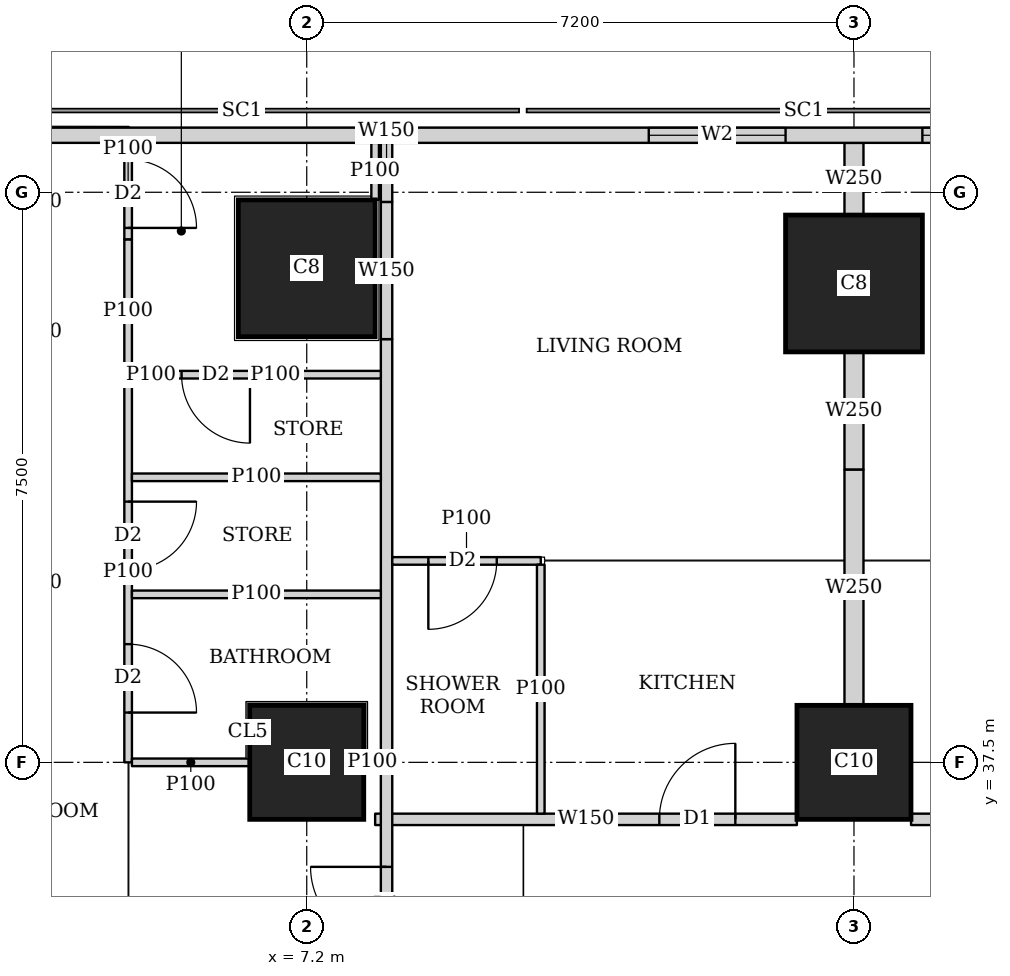
"""IFC4 building model, lengths in metres.
Left out: names, types, materials, properties, quantities, classifications, styles, units other than length and angle.
Written with IfcOpenShell. Run it as: python <this file> out.ifc"""

import sys

from ifc_helpers import new_model, si_unit, direction, frame, frame_2d, origin, origin_2d, place, context, subcontext, project, spatial, rectangle, extrude, element, fill, save


model = new_model("IFC4")
c1 = context("Model", 3, precision=1e-05, world=origin(), true_north=direction((0.0, 1.0)))
c2 = subcontext(c1, "Body", "Model", "MODEL_VIEW")
j1 = project(units=[si_unit("LENGTHUNIT", "METRE"), si_unit("PLANEANGLEUNIT", "RADIAN")], contexts=[c1])
p1 = place(None, origin())
s1 = spatial("IfcSite", under=j1, at=p1, CompositionType="ELEMENT")
p2 = place(p1, origin())
s2 = spatial("IfcBuilding", under=s1, at=p2, CompositionType="ELEMENT")
p3 = place(p2, frame((0.0, 0.0, 147.05)))
s3 = spatial("IfcBuildingStorey", under=s2, at=p3, CompositionType="ELEMENT", Elevation=147.05)
for number, where, z_axis, x_axis in (
    (1, (7.2, 37.5, 0.0), (0.0, 0.0, 1.0), (1.0, 0.0, 0.0)),
    (2, (14.4, 37.5, 0.0), (0.0, 0.0, 1.0), (1.0, 0.0, 0.0)),
):
    element("IfcColumn", number, at=place(p3, frame(where, z_axis=z_axis, x_axis=x_axis)), inside=s3, PredefinedType="COLUMN", context=c2, shape_type="SweptSolid", body=[
        extrude(rectangle(XDim=1.5, YDim=1.5, at=origin_2d()), origin(), (0.0, 0.0, 1.0), 3.75),
    ])
for number, where, z_axis, x_axis in (
    (3, (7.2, 44.0, 0.0), (0.0, 0.0, 1.0), (1.0, 0.0, 0.0)),
    (4, (14.4, 43.8, 0.0), (0.0, 0.0, 1.0), (1.0, 0.0, 0.0)),
):
    element("IfcColumn", number, at=place(p3, frame(where, z_axis=z_axis, x_axis=x_axis)), inside=s3, PredefinedType="COLUMN", context=c2, shape_type="SweptSolid", body=[
        extrude(rectangle(XDim=1.8, YDim=1.8, at=origin_2d()), origin(), (0.0, 0.0, 1.0), 3.75),
    ])
p4 = place(p3, frame((40.106, 45.75, 0.0), z_axis=(0.0, 0.0, 1.0), x_axis=(-1.0, 0.0, 0.0)))
e5 = element("IfcWall", 5, at=p4, inside=s3, PredefinedType="SOLIDWALL", context=c2, shape_type="SweptSolid", body=[
    extrude(rectangle(XDim=37.943, YDim=0.2, at=frame_2d((18.971, 0.0))), origin(), (0.0, 0.0, 1.0), 3.5),
])
p5 = place(p4, frame((8.606, 0.0, 0.9)))
e6 = element("IfcOpeningElement", 6, at=p5, cuts=e5, PredefinedType="OPENING", context=c2, shape_type="SweptSolid", body=[
    extrude(rectangle(XDim=1.8, YDim=1.5, at=frame_2d((0.9, 0.75))), frame((0.0, 0.11, 0.0), z_axis=(0.0, -1.0, 0.0), x_axis=(1.0, 0.0, 0.0)), (0.0, 0.0, 1.0), 0.22),
])
p6 = place(p4, frame((12.206, 0.0, 0.9)))
e7 = element("IfcOpeningElement", 7, at=p6, cuts=e5, PredefinedType="OPENING", context=c2, shape_type="SweptSolid", body=[
    extrude(rectangle(XDim=1.8, YDim=1.5, at=frame_2d((0.9, 0.75))), frame((0.0, 0.11, 0.0), z_axis=(0.0, -1.0, 0.0), x_axis=(1.0, 0.0, 0.0)), (0.0, 0.0, 1.0), 0.22),
])
p7 = place(p4, frame((15.806, 0.0, 0.9)))
e8 = element("IfcOpeningElement", 8, at=p7, cuts=e5, PredefinedType="OPENING", context=c2, shape_type="SweptSolid", body=[
    extrude(rectangle(XDim=1.8, YDim=1.5, at=frame_2d((0.9, 0.75))), frame((0.0, 0.11, 0.0), z_axis=(0.0, -1.0, 0.0), x_axis=(1.0, 0.0, 0.0)), (0.0, 0.0, 1.0), 0.22),
])
p8 = place(p4, frame((19.406, 0.0, 0.9)))
e9 = element("IfcOpeningElement", 9, at=p8, cuts=e5, PredefinedType="OPENING", context=c2, shape_type="SweptSolid", body=[
    extrude(rectangle(XDim=1.8, YDim=1.5, at=frame_2d((0.9, 0.75))), frame((0.0, 0.11, 0.0), z_axis=(0.0, -1.0, 0.0), x_axis=(1.0, 0.0, 0.0)), (0.0, 0.0, 1.0), 0.22),
])
p9 = place(p4, frame((23.006, 0.0, 0.9)))
e10 = element("IfcOpeningElement", 10, at=p9, cuts=e5, PredefinedType="OPENING", context=c2, shape_type="SweptSolid", body=[
    extrude(rectangle(XDim=1.8, YDim=1.5, at=frame_2d((0.9, 0.75))), frame((0.0, 0.11, 0.0), z_axis=(0.0, -1.0, 0.0), x_axis=(1.0, 0.0, 0.0)), (0.0, 0.0, 1.0), 0.22),
])
p10 = place(p4, frame((26.606, 0.0, 0.9)))
e11 = element("IfcOpeningElement", 11, at=p10, cuts=e5, PredefinedType="OPENING", context=c2, shape_type="SweptSolid", body=[
    extrude(rectangle(XDim=1.8, YDim=1.5, at=frame_2d((0.9, 0.75))), frame((0.0, 0.11, 0.0), z_axis=(0.0, -1.0, 0.0), x_axis=(1.0, 0.0, 0.0)), (0.0, 0.0, 1.0), 0.22),
])
p11 = place(p3, frame((8.25, 1.957, 0.0), z_axis=(0.0, 0.0, 1.0), x_axis=(0.0, 1.0, 0.0)))
e12 = element("IfcWall", 12, at=p11, inside=s3, PredefinedType="SOLIDWALL", context=c2, shape_type="SweptSolid", body=[
    extrude(rectangle(XDim=41.111, YDim=0.15, at=frame_2d((20.556, 0.0))), origin(), (0.0, 0.0, 1.0), 3.5),
])
p12 = place(p11, frame((14.418, 0.0, 0.0)))
e13 = element("IfcOpeningElement", 13, at=p12, cuts=e12, PredefinedType="OPENING", context=c2, shape_type="SweptSolid", body=[
    extrude(rectangle(XDim=1.0, YDim=2.1, at=frame_2d((0.5, 1.05))), frame((0.0, 0.085, 0.0), z_axis=(0.0, -1.0, 0.0), x_axis=(1.0, 0.0, 0.0)), (0.0, 0.0, 1.0), 0.17),
])
p13 = place(p11, frame((18.168, 0.0, 0.0)))
e14 = element("IfcOpeningElement", 14, at=p13, cuts=e12, PredefinedType="OPENING", context=c2, shape_type="SweptSolid", body=[
    extrude(rectangle(XDim=1.0, YDim=2.1, at=frame_2d((0.5, 1.05))), frame((0.0, 0.085, 0.0), z_axis=(0.0, -1.0, 0.0), x_axis=(1.0, 0.0, 0.0)), (0.0, 0.0, 1.0), 0.17),
])
p14 = place(p11, frame((33.168, 0.0, 0.0)))
e15 = element("IfcOpeningElement", 15, at=p14, cuts=e12, PredefinedType="OPENING", context=c2, shape_type="SweptSolid", body=[
    extrude(rectangle(XDim=1.0, YDim=2.1, at=frame_2d((0.5, 1.05))), frame((0.0, 0.085, 0.0), z_axis=(0.0, -1.0, 0.0), x_axis=(1.0, 0.0, 0.0)), (0.0, 0.0, 1.0), 0.17),
])
p15 = place(p3, frame((8.25, 43.068, 0.0), z_axis=(0.0, 0.0, 1.0), x_axis=(0.0, 1.0, 0.0)))
e16 = element("IfcWall", 16, at=p15, inside=s3, PredefinedType="SOLIDWALL", context=c2, shape_type="SweptSolid", body=[
    extrude(rectangle(XDim=1.805, YDim=0.15, at=frame_2d((0.902, 0.0))), origin(), (0.0, 0.0, 1.0), 2.1),
])
p16 = place(p3, frame((8.25, 44.873, 0.0), z_axis=(0.0, 0.0, 1.0), x_axis=(0.0, 1.0, 0.0)))
e17 = element("IfcWall", 17, at=p16, inside=s3, PredefinedType="SOLIDWALL", context=c2, shape_type="SweptSolid", body=[
    extrude(rectangle(XDim=0.777, YDim=0.15, at=frame_2d((0.388, 0.0))), origin(), (0.0, 0.0, 1.0), 3.5),
])
p17 = place(p3, frame((8.1, 36.75, 0.0), z_axis=(0.0, 0.0, 1.0), x_axis=(1.0, 0.0, 0.0)))
e18 = element("IfcWall", 18, at=p17, inside=s3, PredefinedType="SOLIDWALL", context=c2, shape_type="SweptSolid", body=[
    extrude(rectangle(XDim=5.549, YDim=0.15, at=frame_2d((2.774, 0.0))), origin(), (0.0, 0.0, 1.0), 3.5),
])
p18 = place(p17, frame((3.739, 0.0, 0.0)))
e19 = element("IfcOpeningElement", 19, at=p18, cuts=e18, PredefinedType="OPENING", context=c2, shape_type="SweptSolid", body=[
    extrude(rectangle(XDim=1.0, YDim=2.1, at=frame_2d((0.5, 1.05))), frame((0.0, 0.085, 0.0), z_axis=(0.0, -1.0, 0.0), x_axis=(1.0, 0.0, 0.0)), (0.0, 0.0, 1.0), 0.17),
])
p19 = place(p3, frame((15.151, 36.75, 0.0), z_axis=(0.0, 0.0, 1.0), x_axis=(1.0, 0.0, 0.0)))
e20 = element("IfcWall", 20, at=p19, inside=s3, PredefinedType="SOLIDWALL", context=c2, shape_type="SweptSolid", body=[
    extrude(rectangle(XDim=5.698, YDim=0.15, at=frame_2d((2.849, 0.0))), origin(), (0.0, 0.0, 1.0), 3.5),
])
p20 = place(p19, frame((0.749, 0.0, 0.0)))
e21 = element("IfcOpeningElement", 21, at=p20, cuts=e20, PredefinedType="OPENING", context=c2, shape_type="SweptSolid", body=[
    extrude(rectangle(XDim=1.0, YDim=2.1, at=frame_2d((0.5, 1.05))), frame((0.0, 0.085, 0.0), z_axis=(0.0, -1.0, 0.0), x_axis=(1.0, 0.0, 0.0)), (0.0, 0.0, 1.0), 0.17),
])
p21 = place(p3, frame((8.1, 45.65, 0.0), z_axis=(0.0, 0.0, 1.0), x_axis=(0.0, -1.0, 0.0)))
e22 = element("IfcWall", 22, at=p21, inside=s3, PredefinedType="PARTITIONING", context=c2, shape_type="SweptSolid", body=[
    extrude(rectangle(XDim=0.749, YDim=0.1, at=frame_2d((0.375, 0.0))), origin(), (0.0, 0.0, 1.0), 3.5),
])
p22 = place(p3, frame((4.85, 37.5, 0.0), z_axis=(0.0, 0.0, 1.0), x_axis=(0.0, 1.0, 0.0)))
e23 = element("IfcWall", 23, at=p22, inside=s3, PredefinedType="PARTITIONING", context=c2, shape_type="SweptSolid", body=[
    extrude(rectangle(XDim=5.007, YDim=0.1, at=frame_2d((2.503, 0.0))), origin(), (0.0, 0.0, 1.0), 3.5),
])
p23 = place(p22, frame((0.655, 0.0, 0.0)))
e24 = element("IfcOpeningElement", 24, at=p23, cuts=e23, PredefinedType="OPENING", context=c2, shape_type="SweptSolid", body=[
    extrude(rectangle(XDim=0.9, YDim=2.1, at=frame_2d((0.45, 1.05))), frame((0.0, 0.06, 0.0), z_axis=(0.0, -1.0, 0.0), x_axis=(1.0, 0.0, 0.0)), (0.0, 0.0, 1.0), 0.12),
])
p24 = place(p22, frame((2.53, 0.0, 0.0)))
e25 = element("IfcOpeningElement", 25, at=p24, cuts=e23, PredefinedType="OPENING", context=c2, shape_type="SweptSolid", body=[
    extrude(rectangle(XDim=0.9, YDim=2.1, at=frame_2d((0.45, 1.05))), frame((0.0, 0.06, 0.0), z_axis=(0.0, -1.0, 0.0), x_axis=(1.0, 0.0, 0.0)), (0.0, 0.0, 1.0), 0.12),
])
p25 = place(p3, frame((4.85, 42.507, 0.0), z_axis=(0.0, 0.0, 1.0), x_axis=(0.0, 1.0, 0.0)))
e26 = element("IfcWall", 26, at=p25, inside=s3, PredefinedType="PARTITIONING", context=c2, shape_type="SweptSolid", body=[
    extrude(rectangle(XDim=1.874, YDim=0.1, at=frame_2d((0.937, 0.0))), origin(), (0.0, 0.0, 1.0), 2.1),
])
p26 = place(p3, frame((4.85, 44.381, 0.0), z_axis=(0.0, 0.0, 1.0), x_axis=(0.0, 1.0, 0.0)))
e27 = element("IfcWall", 27, at=p26, inside=s3, PredefinedType="PARTITIONING", context=c2, shape_type="SweptSolid", body=[
    extrude(rectangle(XDim=1.269, YDim=0.1, at=frame_2d((0.634, 0.0))), origin(), (0.0, 0.0, 1.0), 3.5),
])
p27 = place(p26, frame((0.15, 0.0, 0.0)))
e28 = element("IfcOpeningElement", 28, at=p27, cuts=e27, PredefinedType="OPENING", context=c2, shape_type="SweptSolid", body=[
    extrude(rectangle(XDim=0.9, YDim=2.1, at=frame_2d((0.45, 1.05))), frame((0.0, 0.06, 0.0), z_axis=(0.0, -1.0, 0.0), x_axis=(1.0, 0.0, 0.0)), (0.0, 0.0, 1.0), 0.12),
])
p28 = place(p3, frame((4.9, 37.5, 0.0), z_axis=(0.0, 0.0, 1.0), x_axis=(1.0, 0.0, 0.0)))
e29 = element("IfcWall", 29, at=p28, inside=s3, PredefinedType="PARTITIONING", context=c2, shape_type="SweptSolid", body=[
    extrude(rectangle(XDim=1.549, YDim=0.1, at=frame_2d((0.774, 0.0))), origin(), (0.0, 0.0, 1.0), 3.5),
])
p29 = place(p3, frame((7.951, 37.5, 0.0), z_axis=(0.0, 0.0, 1.0), x_axis=(1.0, 0.0, 0.0)))
e30 = element("IfcWall", 30, at=p29, inside=s3, PredefinedType="PARTITIONING", context=c2, shape_type="SweptSolid", body=[
    extrude(rectangle(XDim=0.224, YDim=0.1, at=frame_2d((0.112, 0.0))), origin(), (0.0, 0.0, 1.0), 3.5),
])
for number, where, z_axis, x_axis in (
    (31, (4.9, 41.25, 0.0), (0.0, 0.0, 1.0), (1.0, 0.0, 0.0)),
    (32, (4.9, 39.71, 0.0), (0.0, 0.0, 1.0), (1.0, 0.0, 0.0)),
):
    element("IfcWall", number, at=place(p3, frame(where, z_axis=z_axis, x_axis=x_axis)), inside=s3, PredefinedType="PARTITIONING", context=c2, shape_type="SweptSolid", body=[
        extrude(rectangle(XDim=3.275, YDim=0.1, at=frame_2d((1.638, 0.0))), origin(), (0.0, 0.0, 1.0), 3.5),
    ])
p30 = place(p3, frame((8.325, 40.15, 0.0), z_axis=(0.0, 0.0, 1.0), x_axis=(1.0, 0.0, 0.0)))
e33 = element("IfcWall", 33, at=p30, inside=s3, PredefinedType="PARTITIONING", context=c2, shape_type="SweptSolid", body=[
    extrude(rectangle(XDim=1.954, YDim=0.1, at=frame_2d((0.977, 0.0))), origin(), (0.0, 0.0, 1.0), 3.5),
])
p31 = place(p30, frame((0.475, 0.0, 0.0)))
e34 = element("IfcOpeningElement", 34, at=p31, cuts=e33, PredefinedType="OPENING", context=c2, shape_type="SweptSolid", body=[
    extrude(rectangle(XDim=0.9, YDim=2.1, at=frame_2d((0.45, 1.05))), frame((0.0, 0.06, 0.0), z_axis=(0.0, -1.0, 0.0), x_axis=(1.0, 0.0, 0.0)), (0.0, 0.0, 1.0), 0.12),
])
p32 = place(p3, frame((10.279, 36.825, 0.0), z_axis=(0.0, 0.0, 1.0), x_axis=(0.0, 1.0, 0.0)))
e35 = element("IfcWall", 35, at=p32, inside=s3, PredefinedType="PARTITIONING", context=c2, shape_type="SweptSolid", body=[
    extrude(rectangle(XDim=3.275, YDim=0.1, at=frame_2d((1.638, 0.0))), origin(), (0.0, 0.0, 1.0), 3.5),
])
p33 = place(p3, frame((14.4, 41.35, 0.0), z_axis=(0.0, 0.0, 1.0), x_axis=(0.0, 1.0, 0.0)))
e36 = element("IfcWall", 36, at=p33, inside=s3, PredefinedType="SOLIDWALL", context=c2, shape_type="SweptSolid", body=[
    extrude(rectangle(XDim=1.549, YDim=0.25, at=frame_2d((0.774, 0.0))), origin(), (0.0, 0.0, 1.0), 2.1),
])
p34 = place(p3, frame((14.4, 44.701, 0.0), z_axis=(0.0, 0.0, 1.0), x_axis=(0.0, 1.0, 0.0)))
e37 = element("IfcWall", 37, at=p34, inside=s3, PredefinedType="SOLIDWALL", context=c2, shape_type="SweptSolid", body=[
    extrude(rectangle(XDim=0.949, YDim=0.25, at=frame_2d((0.475, 0.0))), origin(), (0.0, 0.0, 1.0), 2.1),
])
p35 = place(p3, frame((14.4, 38.251, 0.0), z_axis=(0.0, 0.0, 1.0), x_axis=(0.0, 1.0, 0.0)))
e38 = element("IfcWall", 38, at=p35, inside=s3, PredefinedType="SOLIDWALL", context=c2, shape_type="SweptSolid", body=[
    extrude(rectangle(XDim=3.099, YDim=0.25, at=frame_2d((1.55, 0.0))), origin(), (0.0, 0.0, 1.0), 3.5),
])
p36 = place(p3, frame((4.9, 42.6, 0.0), z_axis=(0.0, 0.0, 1.0), x_axis=(1.0, 0.0, 0.0)))
e39 = element("IfcWall", 39, at=p36, inside=s3, PredefinedType="PARTITIONING", context=c2, shape_type="SweptSolid", body=[
    extrude(rectangle(XDim=0.503, YDim=0.1, at=frame_2d((0.251, 0.0))), origin(), (0.0, 0.0, 1.0), 2.1),
])
p37 = place(p3, frame((5.403, 42.6, 0.0), z_axis=(0.0, 0.0, 1.0), x_axis=(1.0, 0.0, 0.0)))
e40 = element("IfcWall", 40, at=p37, inside=s3, PredefinedType="PARTITIONING", context=c2, shape_type="SweptSolid", body=[
    extrude(rectangle(XDim=2.772, YDim=0.1, at=frame_2d((1.386, 0.0))), origin(), (0.0, 0.0, 1.0), 3.5),
])
p38 = place(p37, frame((0.15, 0.0, 0.0)))
e41 = element("IfcOpeningElement", 41, at=p38, cuts=e40, PredefinedType="OPENING", context=c2, shape_type="SweptSolid", body=[
    extrude(rectangle(XDim=0.9, YDim=2.1, at=frame_2d((0.45, 1.05))), frame((0.0, 0.06, 0.0), z_axis=(0.0, -1.0, 0.0), x_axis=(1.0, 0.0, 0.0)), (0.0, 0.0, 1.0), 0.12),
])
p39 = place(p9, origin())
e42 = element("IfcWindow", 42, at=p39, inside=s3, PartitioningType="SINGLE_PANEL", PredefinedType="WINDOW", context=c2, shape_type="SweptSolid", body=[
    extrude(rectangle(XDim=1.8, YDim=1.5, at=frame_2d((0.9, 0.75))), frame((0.0, 0.03, 0.0), z_axis=(0.0, -1.0, 0.0), x_axis=(1.0, 0.0, 0.0)), (0.0, 0.0, 1.0), 0.06),
])
fill(e10, e42)
p40 = place(p10, origin())
e43 = element("IfcWindow", 43, at=p40, inside=s3, PartitioningType="SINGLE_PANEL", PredefinedType="WINDOW", context=c2, shape_type="SweptSolid", body=[
    extrude(rectangle(XDim=1.8, YDim=1.5, at=frame_2d((0.9, 0.75))), frame((0.0, 0.03, 0.0), z_axis=(0.0, -1.0, 0.0), x_axis=(1.0, 0.0, 0.0)), (0.0, 0.0, 1.0), 0.06),
])
fill(e11, e43)
p41 = place(p23, origin())
e44 = element("IfcDoor", 44, at=p41, inside=s3, OperationType="SINGLE_SWING_RIGHT", PredefinedType="DOOR", context=c2, shape_type="SweptSolid", body=[
    extrude(rectangle(XDim=0.9, YDim=2.1, at=frame_2d((0.45, 1.05))), frame((0.0, 0.025, 0.0), z_axis=(0.0, -1.0, 0.0), x_axis=(1.0, 0.0, 0.0)), (0.0, 0.0, 1.0), 0.05),
])
fill(e24, e44)
p42 = place(p27, origin())
e45 = element("IfcDoor", 45, at=p42, inside=s3, OperationType="SINGLE_SWING_RIGHT", PredefinedType="DOOR", context=c2, shape_type="SweptSolid", body=[
    extrude(rectangle(XDim=0.9, YDim=2.1, at=frame_2d((0.45, 1.05))), frame((0.0, 0.025, 0.0), z_axis=(0.0, -1.0, 0.0), x_axis=(1.0, 0.0, 0.0)), (0.0, 0.0, 1.0), 0.05),
])
fill(e28, e45)
p43 = place(p24, origin())
e46 = element("IfcDoor", 46, at=p43, inside=s3, OperationType="SINGLE_SWING_LEFT", PredefinedType="DOOR", context=c2, shape_type="SweptSolid", body=[
    extrude(rectangle(XDim=0.9, YDim=2.1, at=frame_2d((0.45, 1.05))), frame((0.0, 0.025, 0.0), z_axis=(0.0, -1.0, 0.0), x_axis=(1.0, 0.0, 0.0)), (0.0, 0.0, 1.0), 0.05),
])
fill(e25, e46)
p44 = place(p14, origin())
e47 = element("IfcDoor", 47, at=p44, inside=s3, OperationType="SINGLE_SWING_RIGHT", PredefinedType="DOOR", context=c2, shape_type="SweptSolid", body=[
    extrude(rectangle(XDim=1.0, YDim=2.1, at=frame_2d((0.5, 1.05))), frame((0.0, 0.025, 0.0), z_axis=(0.0, -1.0, 0.0), x_axis=(1.0, 0.0, 0.0)), (0.0, 0.0, 1.0), 0.05),
])
fill(e15, e47)
p45 = place(p31, origin())
e48 = element("IfcDoor", 48, at=p45, inside=s3, OperationType="SINGLE_SWING_RIGHT", PredefinedType="DOOR", context=c2, shape_type="SweptSolid", body=[
    extrude(rectangle(XDim=0.9, YDim=2.1, at=frame_2d((0.45, 1.05))), frame((0.0, 0.025, 0.0), z_axis=(0.0, -1.0, 0.0), x_axis=(1.0, 0.0, 0.0)), (0.0, 0.0, 1.0), 0.05),
])
fill(e34, e48)
p46 = place(p18, origin())
e49 = element("IfcDoor", 49, at=p46, inside=s3, OperationType="SINGLE_SWING_RIGHT", PredefinedType="DOOR", context=c2, shape_type="SweptSolid", body=[
    extrude(rectangle(XDim=1.0, YDim=2.1, at=frame_2d((0.5, 1.05))), frame((0.0, 0.025, 0.0), z_axis=(0.0, -1.0, 0.0), x_axis=(1.0, 0.0, 0.0)), (0.0, 0.0, 1.0), 0.05),
])
fill(e19, e49)
p47 = place(p38, origin())
e50 = element("IfcDoor", 50, at=p47, inside=s3, OperationType="SINGLE_SWING_LEFT", PredefinedType="DOOR", context=c2, shape_type="SweptSolid", body=[
    extrude(rectangle(XDim=0.9, YDim=2.1, at=frame_2d((0.45, 1.05))), frame((0.0, 0.025, 0.0), z_axis=(0.0, -1.0, 0.0), x_axis=(1.0, 0.0, 0.0)), (0.0, 0.0, 1.0), 0.05),
])
fill(e41, e50)
save(model, sys.argv[1])
